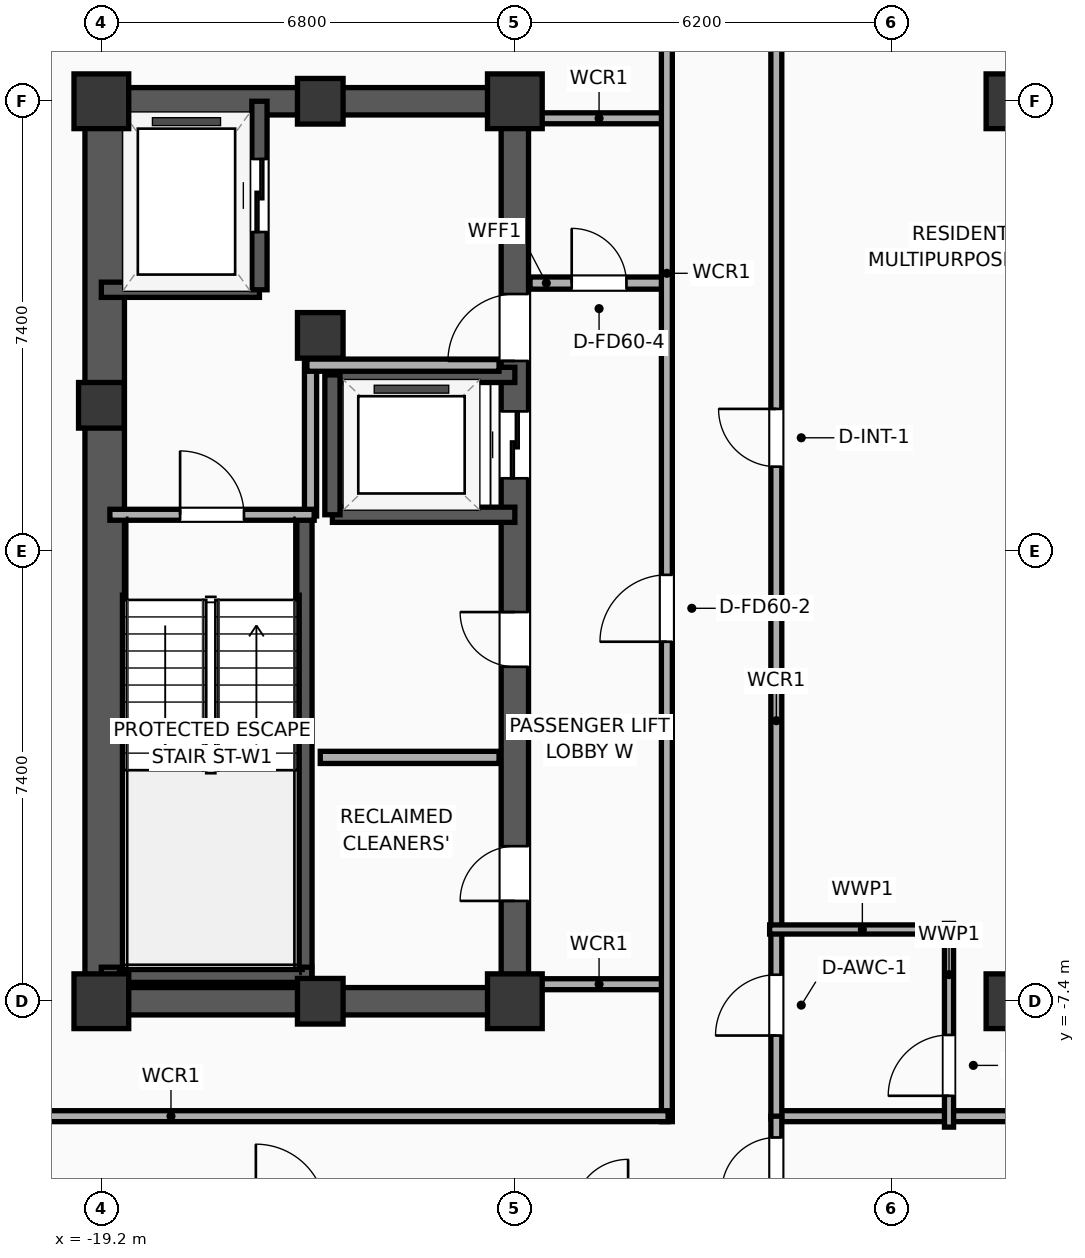
"""IFC4 building model, lengths in metres.
Left out: names, types, materials, properties, quantities, classifications, styles, units other than length and angle.
Written with IfcOpenShell. Run it as: python <this file> out.ifc"""

import sys

from ifc_helpers import new_model, si_unit, direction, frame, frame_2d, origin, origin_2d, place, context, subcontext, project, spatial, rectangle, extrude, element, fill, save


model = new_model("IFC4")
c1 = context("Model", 3, precision=1e-05, world=origin(), true_north=direction((0.0, 1.0)))
c2 = subcontext(c1, "Body", "Model", "MODEL_VIEW")
j1 = project(units=[si_unit("LENGTHUNIT", "METRE"), si_unit("PLANEANGLEUNIT", "RADIAN")], contexts=[c1])
p1 = place(None, origin())
s1 = spatial("IfcSite", under=j1, at=p1, CompositionType="ELEMENT")
p2 = place(p1, origin())
s2 = spatial("IfcBuilding", under=s1, at=p2, CompositionType="ELEMENT")
p3 = place(p2, frame((0.0, 0.0, 243.1)))
s3 = spatial("IfcBuildingStorey", under=s2, at=p3, CompositionType="ELEMENT", Elevation=243.1)
p4 = place(p3, frame((-19.2, -7.4, 0.0), z_axis=(0.0, 0.0, 1.0), x_axis=(1.0, 0.0, 0.0)))
e1 = element("IfcColumn", 1, at=p4, inside=s3, PredefinedType="COLUMN", context=c2, shape_type="SweptSolid", body=[
    extrude(rectangle(XDim=0.9, YDim=0.9, at=origin_2d()), origin(), (0.0, 0.0, 1.0), 3.9),
])
p5 = place(p3, frame((-19.2, 2.4, 0.0), z_axis=(0.0, 0.0, 1.0), x_axis=(1.0, 0.0, 0.0)))
e2 = element("IfcColumn", 2, at=p5, inside=s3, PredefinedType="COLUMN", context=c2, shape_type="SweptSolid", body=[
    extrude(rectangle(XDim=0.75, YDim=0.75, at=origin_2d()), origin(), (0.0, 0.0, 1.0), 3.9),
])
p6 = place(p3, frame((-19.2, 7.4, 0.0), z_axis=(0.0, 0.0, 1.0), x_axis=(1.0, 0.0, 0.0)))
e3 = element("IfcColumn", 3, at=p6, inside=s3, PredefinedType="COLUMN", context=c2, shape_type="SweptSolid", body=[
    extrude(rectangle(XDim=0.9, YDim=0.9, at=origin_2d()), origin(), (0.0, 0.0, 1.0), 3.9),
])
for number, where, z_axis, x_axis in (
    (4, (-15.6, -7.4, 0.0), (0.0, 0.0, 1.0), (1.0, 0.0, 0.0)),
    (5, (-15.6, 7.4, 0.0), (0.0, 0.0, 1.0), (1.0, 0.0, 0.0)),
):
    element("IfcColumn", number, at=place(p3, frame(where, z_axis=z_axis, x_axis=x_axis)), inside=s3, PredefinedType="COLUMN", context=c2, shape_type="SweptSolid", body=[
        extrude(rectangle(XDim=0.75, YDim=0.75, at=origin_2d()), origin(), (0.0, 0.0, 1.0), 3.9),
    ])
p7 = place(p3, frame((-12.4, -7.4, 0.0), z_axis=(0.0, 0.0, 1.0), x_axis=(1.0, 0.0, 0.0)))
e6 = element("IfcColumn", 6, at=p7, inside=s3, PredefinedType="COLUMN", context=c2, shape_type="SweptSolid", body=[
    extrude(rectangle(XDim=0.9, YDim=0.9, at=origin_2d()), origin(), (0.0, 0.0, 1.0), 3.9),
])
p8 = place(p3, frame((-15.6, 3.55, 0.0), z_axis=(0.0, 0.0, 1.0), x_axis=(1.0, 0.0, 0.0)))
e7 = element("IfcColumn", 7, at=p8, inside=s3, PredefinedType="COLUMN", context=c2, shape_type="SweptSolid", body=[
    extrude(rectangle(XDim=0.75, YDim=0.75, at=origin_2d()), origin(), (0.0, 0.0, 1.0), 3.9),
])
p9 = place(p3, frame((-12.4, 7.4, 0.0), z_axis=(0.0, 0.0, 1.0), x_axis=(1.0, 0.0, 0.0)))
e8 = element("IfcColumn", 8, at=p9, inside=s3, PredefinedType="COLUMN", context=c2, shape_type="SweptSolid", body=[
    extrude(rectangle(XDim=0.9, YDim=0.9, at=origin_2d()), origin(), (0.0, 0.0, 1.0), 3.9),
])
for number, where, z_axis, x_axis in (
    (9, (-19.425, -7.4, 0.0), (0.0, 0.0, 1.0), (1.0, 0.0, 0.0)),
    (10, (-19.425, 7.4, 0.0), (0.0, 0.0, 1.0), (1.0, 0.0, 0.0)),
):
    element("IfcWall", number, at=place(p3, frame(where, z_axis=z_axis, x_axis=x_axis)), inside=s3, PredefinedType="SHEAR", context=c2, shape_type="SweptSolid", body=[
        extrude(rectangle(XDim=7.25, YDim=0.45, at=frame_2d((3.625, 0.0))), origin(), (0.0, 0.0, 1.0), 3.65),
    ])
p10 = place(p3, frame((-19.145, -7.4, 0.0), z_axis=(0.0, 0.0, 1.0), x_axis=(0.0, 1.0, 0.0)))
e11 = element("IfcWall", 11, at=p10, inside=s3, PredefinedType="SHEAR", context=c2, shape_type="SweptSolid", body=[
    extrude(rectangle(XDim=14.8, YDim=0.65, at=frame_2d((7.4, 0.0))), origin(), (0.0, 0.0, 1.0), 3.65),
])
p11 = place(p3, frame((-12.4, -7.4, 0.0), z_axis=(0.0, 0.0, 1.0), x_axis=(0.0, 1.0, 0.0)))
e12 = element("IfcWall", 12, at=p11, inside=s3, PredefinedType="SHEAR", context=c2, shape_type="SweptSolid", body=[
    extrude(rectangle(XDim=14.8, YDim=0.45, at=frame_2d((7.4, 0.0))), origin(), (0.0, 0.0, 1.0), 3.65),
])
p12 = place(p11, frame((8.6, 0.0, 0.0)))
e13 = element("IfcOpeningElement", 13, at=p12, cuts=e12, PredefinedType="OPENING", context=c2, shape_type="SweptSolid", body=[
    extrude(rectangle(XDim=1.1, YDim=2.05, at=frame_2d((0.55, 1.025))), frame((0.0, 0.235, 0.0), z_axis=(0.0, -1.0, 0.0), x_axis=(1.0, 0.0, 0.0)), (0.0, 0.0, 1.0), 0.47),
])
p13 = place(p11, frame((10.53, 0.0, 0.0)))
e14 = element("IfcOpeningElement", 14, at=p13, cuts=e12, PredefinedType="OPENING", context=c2, shape_type="SweptSolid", body=[
    extrude(rectangle(XDim=1.1, YDim=2.05, at=frame_2d((0.55, 1.025))), frame((0.0, 0.235, 0.0), z_axis=(0.0, -1.0, 0.0), x_axis=(1.0, 0.0, 0.0)), (0.0, 0.0, 1.0), 0.47),
])
p14 = place(p11, frame((1.65, 0.0, 0.0)))
e15 = element("IfcOpeningElement", 15, at=p14, cuts=e12, PredefinedType="OPENING", context=c2, shape_type="SweptSolid", body=[
    extrude(rectangle(XDim=0.9, YDim=2.05, at=frame_2d((0.45, 1.025))), frame((0.0, 0.235, 0.0), z_axis=(0.0, -1.0, 0.0), x_axis=(1.0, 0.0, 0.0)), (0.0, 0.0, 1.0), 0.47),
])
p15 = place(p11, frame((5.5, 0.0, 0.0)))
e16 = element("IfcOpeningElement", 16, at=p15, cuts=e12, PredefinedType="OPENING", context=c2, shape_type="SweptSolid", body=[
    extrude(rectangle(XDim=0.9, YDim=2.05, at=frame_2d((0.45, 1.025))), frame((0.0, 0.235, 0.0), z_axis=(0.0, -1.0, 0.0), x_axis=(1.0, 0.0, 0.0)), (0.0, 0.0, 1.0), 0.47),
])
p16 = place(p3, frame((-15.86, -7.085, 0.0), z_axis=(0.0, 0.0, 1.0), x_axis=(0.0, 1.0, 0.0)))
e17 = element("IfcWall", 17, at=p16, inside=s3, PredefinedType="SOLIDWALL", context=c2, shape_type="SweptSolid", body=[
    extrude(rectangle(XDim=7.685, YDim=0.25, at=frame_2d((3.843, 0.0))), origin(), (0.0, 0.0, 1.0), 3.65),
])
p17 = place(p3, frame((-19.2, -6.965, 0.0), z_axis=(0.0, 0.0, 1.0), x_axis=(1.0, 0.0, 0.0)))
e18 = element("IfcWall", 18, at=p17, inside=s3, PredefinedType="SOLIDWALL", context=c2, shape_type="SweptSolid", body=[
    extrude(rectangle(XDim=3.46, YDim=0.25, at=frame_2d((1.73, 0.0))), origin(), (0.0, 0.0, 1.0), 3.65),
])
for number, where, z_axis, x_axis in (
    (19, (-4.2, -7.4, 0.0), (0.0, 0.0, 1.0), (1.0, 0.0, 0.0)),
    (20, (-4.2, 7.4, 0.0), (0.0, 0.0, 1.0), (1.0, 0.0, 0.0)),
):
    element("IfcColumn", number, at=place(p3, frame(where, z_axis=z_axis, x_axis=x_axis)), inside=s3, PredefinedType="COLUMN", context=c2, shape_type="SweptSolid", body=[
        extrude(rectangle(XDim=0.9, YDim=0.9, at=origin_2d()), origin(), (0.0, 0.0, 1.0), 3.9),
    ])
p18 = place(p3, frame((-19.2, 4.3, 0.0), z_axis=(0.0, 0.0, 1.0), x_axis=(1.0, 0.0, 0.0)))
e21 = element("IfcWall", 21, at=p18, inside=s3, PredefinedType="SOLIDWALL", context=c2, shape_type="SweptSolid", body=[
    extrude(rectangle(XDim=2.6, YDim=0.25, at=frame_2d((1.3, 0.0))), origin(), (0.0, 0.0, 1.0), 3.65),
])
p19 = place(p3, frame((-16.6, 4.3, 0.0), z_axis=(0.0, 0.0, 1.0), x_axis=(0.0, 1.0, 0.0)))
e22 = element("IfcWall", 22, at=p19, inside=s3, PredefinedType="SOLIDWALL", context=c2, shape_type="SweptSolid", body=[
    extrude(rectangle(XDim=3.1, YDim=0.25, at=frame_2d((1.55, 0.0))), origin(), (0.0, 0.0, 1.0), 3.65),
])
p20 = place(p19, frame((0.95, 0.0, 0.0)))
e23 = element("IfcOpeningElement", 23, at=p20, cuts=e22, PredefinedType="OPENING", context=c2, shape_type="SweptSolid", body=[
    extrude(rectangle(XDim=1.2, YDim=2.05, at=frame_2d((0.6, 1.025))), frame((0.0, 0.135, 0.0), z_axis=(0.0, -1.0, 0.0), x_axis=(1.0, 0.0, 0.0)), (0.0, 0.0, 1.0), 0.27),
])
for number, where, z_axis, x_axis in (
    (24, (-15.4, 0.6, 0.0), (0.0, 0.0, 1.0), (1.0, 0.0, 0.0)),
    (25, (-12.4, 2.9, 0.0), (0.0, 0.0, 1.0), (-1.0, 0.0, 0.0)),
):
    element("IfcWall", number, at=place(p3, frame(where, z_axis=z_axis, x_axis=x_axis)), inside=s3, PredefinedType="SOLIDWALL", context=c2, shape_type="SweptSolid", body=[
        extrude(rectangle(XDim=3.0, YDim=0.25, at=frame_2d((1.5, 0.0))), origin(), (0.0, 0.0, 1.0), 3.65),
    ])
p21 = place(p3, frame((-15.4, 2.9, 0.0), z_axis=(0.0, 0.0, 1.0), x_axis=(0.0, -1.0, 0.0)))
e26 = element("IfcWall", 26, at=p21, inside=s3, PredefinedType="SOLIDWALL", context=c2, shape_type="SweptSolid", body=[
    extrude(rectangle(XDim=2.3, YDim=0.25, at=frame_2d((1.15, 0.0))), origin(), (0.0, 0.0, 1.0), 3.65),
])
p22 = place(p3, frame((-15.76, 0.58, 0.0), z_axis=(0.0, 0.0, 1.0), x_axis=(0.0, 1.0, 0.0)))
e27 = element("IfcWall", 27, at=p22, inside=s3, PredefinedType="PARTITIONING", context=c2, shape_type="SweptSolid", body=[
    extrude(rectangle(XDim=2.52, YDim=0.2, at=frame_2d((1.26, 0.0))), origin(), (0.0, 0.0, 1.0), 3.65),
])
p23 = place(p3, frame((-15.82, 3.06, 0.0), z_axis=(0.0, 0.0, 1.0), x_axis=(1.0, 0.0, 0.0)))
e28 = element("IfcWall", 28, at=p23, inside=s3, PredefinedType="PARTITIONING", context=c2, shape_type="SweptSolid", body=[
    extrude(rectangle(XDim=3.16, YDim=0.2, at=frame_2d((1.58, 0.0))), origin(), (0.0, 0.0, 1.0), 3.65),
])
p24 = place(p3, frame((-19.06, 0.6, 0.0), z_axis=(0.0, 0.0, 1.0), x_axis=(1.0, 0.0, 0.0)))
e29 = element("IfcWall", 29, at=p24, inside=s3, PredefinedType="PARTITIONING", context=c2, shape_type="SweptSolid", body=[
    extrude(rectangle(XDim=3.36, YDim=0.18, at=frame_2d((1.68, 0.0))), origin(), (0.0, 0.0, 1.0), 3.65),
])
p25 = place(p24, frame((1.155, 0.0, 0.0)))
e30 = element("IfcOpeningElement", 30, at=p25, cuts=e29, PredefinedType="OPENING", context=c2, shape_type="SweptSolid", body=[
    extrude(rectangle(XDim=1.05, YDim=2.05, at=frame_2d((0.525, 1.025))), frame((0.0, 0.1, 0.0), z_axis=(0.0, -1.0, 0.0), x_axis=(1.0, 0.0, 0.0)), (0.0, 0.0, 1.0), 0.2),
])
p26 = place(p3, frame((-15.6, -3.39, 0.0), z_axis=(0.0, 0.0, 1.0), x_axis=(1.0, 0.0, 0.0)))
e31 = element("IfcWall", 31, at=p26, inside=s3, PredefinedType="PARTITIONING", context=c2, shape_type="SweptSolid", body=[
    extrude(rectangle(XDim=2.94, YDim=0.2, at=frame_2d((1.47, 0.0))), origin(), (0.0, 0.0, 1.0), 3.65),
])
p27 = place(p3, frame((-12.15, 4.41, 0.0), z_axis=(0.0, 0.0, 1.0), x_axis=(1.0, 0.0, 0.0)))
e32 = element("IfcWall", 32, at=p27, inside=s3, PredefinedType="PARTITIONING", context=c2, shape_type="SweptSolid", body=[
    extrude(rectangle(XDim=2.27, YDim=0.2, at=frame_2d((1.135, 0.0))), origin(), (0.0, 0.0, 1.0), 3.65),
])
p28 = place(p27, frame((0.685, 0.0, 0.0)))
e33 = element("IfcOpeningElement", 33, at=p28, cuts=e32, PredefinedType="OPENING", context=c2, shape_type="SweptSolid", body=[
    extrude(rectangle(XDim=0.9, YDim=2.05, at=frame_2d((0.45, 1.025))), frame((0.0, 0.11, 0.0), z_axis=(0.0, -1.0, 0.0), x_axis=(1.0, 0.0, 0.0)), (0.0, 0.0, 1.0), 0.22),
])
for number, where, z_axis, x_axis in (
    (34, (-12.15, 7.12, 0.0), (0.0, 0.0, 1.0), (1.0, 0.0, 0.0)),
    (35, (-12.15, -7.12, 0.0), (0.0, 0.0, 1.0), (1.0, 0.0, 0.0)),
):
    element("IfcWall", number, at=place(p3, frame(where, z_axis=z_axis, x_axis=x_axis)), inside=s3, PredefinedType="PARTITIONING", context=c2, shape_type="SweptSolid", body=[
        extrude(rectangle(XDim=2.27, YDim=0.18, at=frame_2d((1.135, 0.0))), origin(), (0.0, 0.0, 1.0), 3.65),
    ])
p29 = place(p3, frame((-9.9, -9.38, 0.0), z_axis=(0.0, 0.0, 1.0), x_axis=(0.0, 1.0, 0.0)))
e36 = element("IfcWall", 36, at=p29, inside=s3, PredefinedType="PARTITIONING", context=c2, shape_type="SweptSolid", body=[
    extrude(rectangle(XDim=18.76, YDim=0.18, at=frame_2d((9.38, 0.0))), origin(), (0.0, 0.0, 1.0), 3.65),
])
p30 = place(p29, frame((7.892, 0.0, 0.0)))
e37 = element("IfcOpeningElement", 37, at=p30, cuts=e36, PredefinedType="OPENING", context=c2, shape_type="SweptSolid", body=[
    extrude(rectangle(XDim=1.1, YDim=2.05, at=frame_2d((0.55, 1.025))), frame((0.0, 0.1, 0.0), z_axis=(0.0, -1.0, 0.0), x_axis=(1.0, 0.0, 0.0)), (0.0, 0.0, 1.0), 0.2),
])
p31 = place(p3, frame((-26.23, -9.29, 0.0), z_axis=(0.0, 0.0, 1.0), x_axis=(1.0, 0.0, 0.0)))
e38 = element("IfcWall", 38, at=p31, inside=s3, PredefinedType="PARTITIONING", context=c2, shape_type="SweptSolid", body=[
    extrude(rectangle(XDim=16.35, YDim=0.18, at=frame_2d((8.175, 0.0))), origin(), (0.0, 0.0, 1.0), 3.65),
])
p32 = place(p3, frame((-8.15, -9.29, 0.0), z_axis=(0.0, 0.0, 1.0), x_axis=(1.0, 0.0, 0.0)))
e39 = element("IfcWall", 39, at=p32, inside=s3, PredefinedType="PARTITIONING", context=c2, shape_type="SweptSolid", body=[
    extrude(rectangle(XDim=16.3, YDim=0.18, at=frame_2d((8.15, 0.0))), origin(), (0.0, 0.0, 1.0), 3.65),
])
p33 = place(p3, frame((-8.1, -9.33, 0.0), z_axis=(0.0, 0.0, 1.0), x_axis=(0.0, 1.0, 0.0)))
e40 = element("IfcWall", 40, at=p33, inside=s3, PredefinedType="PARTITIONING", context=c2, shape_type="SweptSolid", body=[
    extrude(rectangle(XDim=18.66, YDim=0.18, at=frame_2d((9.33, 0.0))), origin(), (0.0, 0.0, 1.0), 3.65),
])
p34 = place(p33, frame((1.366, 0.0, 0.0)))
e41 = element("IfcOpeningElement", 41, at=p34, cuts=e40, PredefinedType="OPENING", context=c2, shape_type="SweptSolid", body=[
    extrude(rectangle(XDim=1.0, YDim=2.05, at=frame_2d((0.5, 1.025))), frame((0.0, 0.1, 0.0), z_axis=(0.0, -1.0, 0.0), x_axis=(1.0, 0.0, 0.0)), (0.0, 0.0, 1.0), 0.2),
])
p35 = place(p33, frame((10.721, 0.0, 0.0)))
e42 = element("IfcOpeningElement", 42, at=p35, cuts=e40, PredefinedType="OPENING", context=c2, shape_type="SweptSolid", body=[
    extrude(rectangle(XDim=0.95, YDim=2.05, at=frame_2d((0.475, 1.025))), frame((0.0, 0.1, 0.0), z_axis=(0.0, -1.0, 0.0), x_axis=(1.0, 0.0, 0.0)), (0.0, 0.0, 1.0), 0.2),
])
p36 = place(p3, frame((-5.26, -9.47, 0.0), z_axis=(0.0, 0.0, 1.0), x_axis=(0.0, 1.0, 0.0)))
e43 = element("IfcWall", 43, at=p36, inside=s3, PredefinedType="PLUMBINGWALL", context=c2, shape_type="SweptSolid", body=[
    extrude(rectangle(XDim=3.35, YDim=0.15, at=frame_2d((1.675, 0.0))), origin(), (0.0, 0.0, 1.0), 3.65),
])
p37 = place(p36, frame((0.515, 0.0, 0.0)))
e44 = element("IfcOpeningElement", 44, at=p37, cuts=e43, PredefinedType="OPENING", context=c2, shape_type="SweptSolid", body=[
    extrude(rectangle(XDim=1.0, YDim=2.05, at=frame_2d((0.5, 1.025))), frame((0.0, 0.085, 0.0), z_axis=(0.0, -1.0, 0.0), x_axis=(1.0, 0.0, 0.0)), (0.0, 0.0, 1.0), 0.17),
])
p38 = place(p3, frame((-8.21, -6.22, 0.0), z_axis=(0.0, 0.0, 1.0), x_axis=(1.0, 0.0, 0.0)))
e45 = element("IfcWall", 45, at=p38, inside=s3, PredefinedType="PLUMBINGWALL", context=c2, shape_type="SweptSolid", body=[
    extrude(rectangle(XDim=3.05, YDim=0.15, at=frame_2d((1.525, 0.0))), origin(), (0.0, 0.0, 1.0), 3.65),
])
p39 = place(p3, frame((-8.1, -18.83, 0.0), z_axis=(0.0, 0.0, 1.0), x_axis=(0.0, 1.0, 0.0)))
e46 = element("IfcWall", 46, at=p39, inside=s3, PredefinedType="PARTITIONING", context=c2, shape_type="SweptSolid", body=[
    extrude(rectangle(XDim=9.54, YDim=0.18, at=frame_2d((4.77, 0.0))), origin(), (0.0, 0.0, 1.0), 3.65),
])
p40 = place(p39, frame((8.29, 0.0, 0.0)))
e47 = element("IfcOpeningElement", 47, at=p40, cuts=e46, PredefinedType="OPENING", context=c2, shape_type="SweptSolid", body=[
    extrude(rectangle(XDim=0.9, YDim=2.05, at=frame_2d((0.45, 1.025))), frame((0.0, 0.1, 0.0), z_axis=(0.0, -1.0, 0.0), x_axis=(1.0, 0.0, 0.0)), (0.0, 0.0, 1.0), 0.2),
])
p41 = place(p20, origin())
e48 = element("IfcDoor", 48, at=p41, inside=s3, OperationType="SLIDING_TO_LEFT", PredefinedType="DOOR", context=c2, shape_type="SweptSolid", body=[
    extrude(rectangle(XDim=1.2, YDim=2.05, at=frame_2d((0.6, 1.025))), frame((0.0, 0.025, 0.0), z_axis=(0.0, -1.0, 0.0), x_axis=(1.0, 0.0, 0.0)), (0.0, 0.0, 1.0), 0.05),
])
fill(e23, e48)
p42 = place(p12, origin())
e49 = element("IfcDoor", 49, at=p42, inside=s3, OperationType="SLIDING_TO_LEFT", PredefinedType="DOOR", context=c2, shape_type="SweptSolid", body=[
    extrude(rectangle(XDim=1.1, YDim=2.05, at=frame_2d((0.55, 1.025))), frame((0.0, 0.025, 0.0), z_axis=(0.0, -1.0, 0.0), x_axis=(1.0, 0.0, 0.0)), (0.0, 0.0, 1.0), 0.05),
])
fill(e13, e49)
p43 = place(p25, origin())
e50 = element("IfcDoor", 50, at=p43, inside=s3, OperationType="SINGLE_SWING_LEFT", PredefinedType="DOOR", context=c2, shape_type="SweptSolid", body=[
    extrude(rectangle(XDim=1.05, YDim=2.05, at=frame_2d((0.525, 1.025))), frame((0.0, 0.025, 0.0), z_axis=(0.0, -1.0, 0.0), x_axis=(1.0, 0.0, 0.0)), (0.0, 0.0, 1.0), 0.05),
])
fill(e30, e50)
p44 = place(p28, origin())
e51 = element("IfcDoor", 51, at=p44, inside=s3, OperationType="SINGLE_SWING_LEFT", PredefinedType="DOOR", context=c2, shape_type="SweptSolid", body=[
    extrude(rectangle(XDim=0.9, YDim=2.05, at=frame_2d((0.45, 1.025))), frame((0.0, 0.025, 0.0), z_axis=(0.0, -1.0, 0.0), x_axis=(1.0, 0.0, 0.0)), (0.0, 0.0, 1.0), 0.05),
])
fill(e33, e51)
p45 = place(p30, origin())
e52 = element("IfcDoor", 52, at=p45, inside=s3, OperationType="SINGLE_SWING_LEFT", PredefinedType="DOOR", context=c2, shape_type="SweptSolid", body=[
    extrude(rectangle(XDim=1.1, YDim=2.05, at=frame_2d((0.55, 1.025))), frame((0.0, 0.025, 0.0), z_axis=(0.0, -1.0, 0.0), x_axis=(1.0, 0.0, 0.0)), (0.0, 0.0, 1.0), 0.05),
])
fill(e37, e52)
p46 = place(p34, origin())
e53 = element("IfcDoor", 53, at=p46, inside=s3, OperationType="SINGLE_SWING_LEFT", PredefinedType="DOOR", context=c2, shape_type="SweptSolid", body=[
    extrude(rectangle(XDim=1.0, YDim=2.05, at=frame_2d((0.5, 1.025))), frame((0.0, 0.025, 0.0), z_axis=(0.0, -1.0, 0.0), x_axis=(1.0, 0.0, 0.0)), (0.0, 0.0, 1.0), 0.05),
])
fill(e41, e53)
p47 = place(p35, origin())
e54 = element("IfcDoor", 54, at=p47, inside=s3, OperationType="SINGLE_SWING_RIGHT", PredefinedType="DOOR", context=c2, shape_type="SweptSolid", body=[
    extrude(rectangle(XDim=0.95, YDim=2.05, at=frame_2d((0.475, 1.025))), frame((0.0, 0.025, 0.0), z_axis=(0.0, -1.0, 0.0), x_axis=(1.0, 0.0, 0.0)), (0.0, 0.0, 1.0), 0.05),
])
fill(e42, e54)
p48 = place(p37, origin())
e55 = element("IfcDoor", 55, at=p48, inside=s3, OperationType="SINGLE_SWING_LEFT", PredefinedType="DOOR", context=c2, shape_type="SweptSolid", body=[
    extrude(rectangle(XDim=1.0, YDim=2.05, at=frame_2d((0.5, 1.025))), frame((0.0, 0.025, 0.0), z_axis=(0.0, -1.0, 0.0), x_axis=(1.0, 0.0, 0.0)), (0.0, 0.0, 1.0), 0.05),
])
fill(e44, e55)
p49 = place(p40, origin())
e56 = element("IfcDoor", 56, at=p49, inside=s3, OperationType="SINGLE_SWING_LEFT", PredefinedType="DOOR", context=c2, shape_type="SweptSolid", body=[
    extrude(rectangle(XDim=0.9, YDim=2.05, at=frame_2d((0.45, 1.025))), frame((0.0, 0.025, 0.0), z_axis=(0.0, -1.0, 0.0), x_axis=(1.0, 0.0, 0.0)), (0.0, 0.0, 1.0), 0.05),
])
fill(e47, e56)
p50 = place(p13, origin())
e57 = element("IfcDoor", 57, at=p50, inside=s3, OperationType="SINGLE_SWING_LEFT", PredefinedType="DOOR", context=c2, shape_type="SweptSolid", body=[
    extrude(rectangle(XDim=1.1, YDim=2.05, at=frame_2d((0.55, 1.025))), frame((0.0, 0.025, 0.0), z_axis=(0.0, -1.0, 0.0), x_axis=(1.0, 0.0, 0.0)), (0.0, 0.0, 1.0), 0.05),
])
fill(e14, e57)
p51 = place(p14, origin())
e58 = element("IfcDoor", 58, at=p51, inside=s3, OperationType="SINGLE_SWING_LEFT", PredefinedType="DOOR", context=c2, shape_type="SweptSolid", body=[
    extrude(rectangle(XDim=0.9, YDim=2.05, at=frame_2d((0.45, 1.025))), frame((0.0, 0.025, 0.0), z_axis=(0.0, -1.0, 0.0), x_axis=(1.0, 0.0, 0.0)), (0.0, 0.0, 1.0), 0.05),
])
fill(e15, e58)
p52 = place(p15, origin())
e59 = element("IfcDoor", 59, at=p52, inside=s3, OperationType="SINGLE_SWING_RIGHT", PredefinedType="DOOR", context=c2, shape_type="SweptSolid", body=[
    extrude(rectangle(XDim=0.9, YDim=2.05, at=frame_2d((0.45, 1.025))), frame((0.0, 0.025, 0.0), z_axis=(0.0, -1.0, 0.0), x_axis=(1.0, 0.0, 0.0)), (0.0, 0.0, 1.0), 0.05),
])
fill(e16, e59)
save(model, sys.argv[1])
